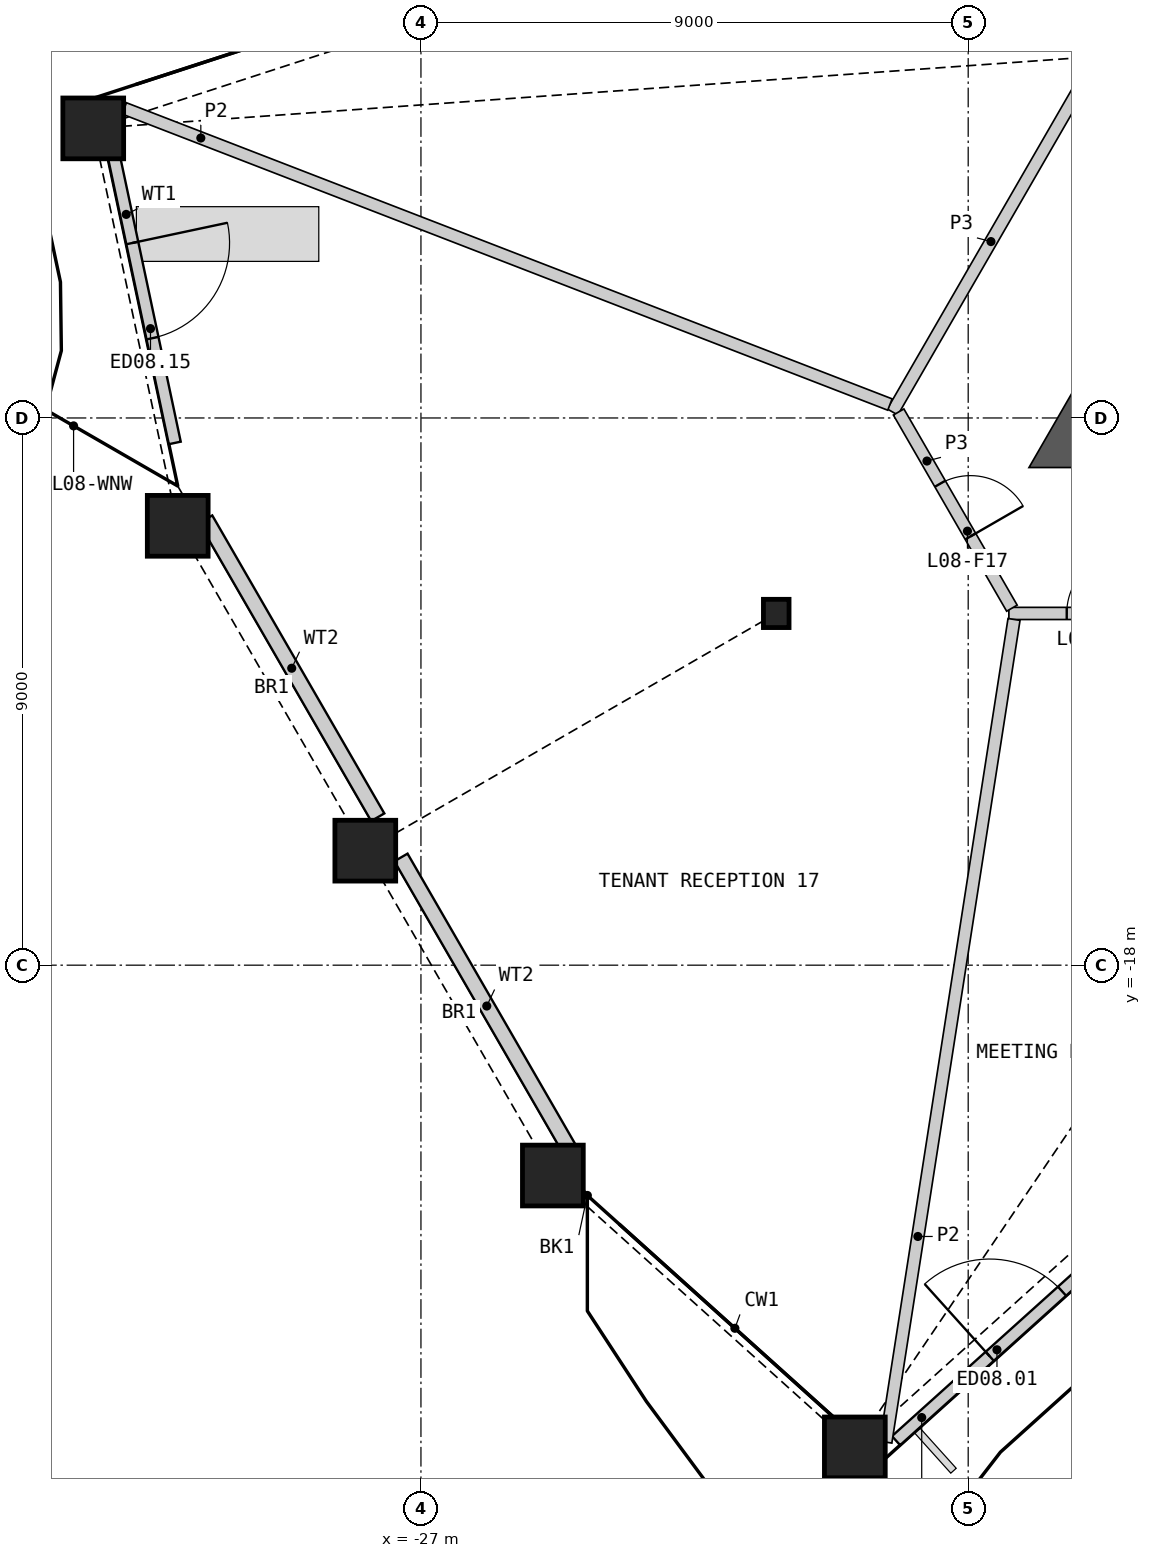
"""IFC4 building model, lengths in metres.
Left out: names, types, materials, properties, quantities, classifications, styles, units other than length and angle.
Written with IfcOpenShell. Run it as: python <this file> out.ifc"""

import sys

from ifc_helpers import new_model, si_unit, direction, frame, frame_2d, origin, origin_2d, place, context, subcontext, project, spatial, polyline, rectangle, hollow_rectangle, i_section, outline, extrude, element, fill, save


model = new_model("IFC4")
c1 = context("Model", 3, precision=1e-05, world=origin(), true_north=direction((0.0, 1.0)))
c2 = subcontext(c1, "Body", "Model", "MODEL_VIEW")
j1 = project(units=[si_unit("LENGTHUNIT", "METRE"), si_unit("PLANEANGLEUNIT", "RADIAN")], contexts=[c1])
p1 = place(None, origin())
s1 = spatial("IfcSite", under=j1, at=p1, CompositionType="ELEMENT")
p2 = place(p1, origin())
s2 = spatial("IfcBuilding", under=s1, at=p2, CompositionType="ELEMENT")
p3 = place(p2, frame((0.0, 0.0, 42.6)))
s3 = spatial("IfcBuildingStorey", under=s2, at=p3, CompositionType="ELEMENT", Elevation=42.6)
for number, where, z_axis, x_axis in (
    (1, (-24.83, -21.46, 0.0), (0.0, 0.0, 1.0), (1.0, 0.0, 0.0)),
    (2, (-19.864, -25.931, 0.0), (0.0, 0.0, 1.0), (1.0, 0.0, 0.0)),
    (3, (-32.389, -4.237, 0.0), (0.0, 0.0, 1.0), (1.0, 0.0, 0.0)),
    (4, (-31.0, -10.774, 0.0), (0.0, 0.0, 1.0), (1.0, 0.0, 0.0)),
    (5, (-27.915, -16.117, 0.0), (0.0, 0.0, 1.0), (1.0, 0.0, 0.0)),
):
    element("IfcColumn", number, at=place(p3, frame(where, z_axis=z_axis, x_axis=x_axis)), inside=s3, PredefinedType="COLUMN", context=c2, shape_type="SweptSolid", body=[
        extrude(hollow_rectangle(XDim=1.0, YDim=1.0, WallThickness=0.07, at=origin_2d()), origin(), (0.0, 0.0, 1.0), 4.2),
    ])
p4 = place(p3, frame((-21.157, -12.215, 0.0), z_axis=(0.0, 0.0, 1.0), x_axis=(1.0, 0.0, 0.0)))
e6 = element("IfcColumn", 6, at=p4, inside=s3, PredefinedType="COLUMN", context=c2, shape_type="SweptSolid", body=[
    extrude(i_section(OverallWidth=0.421, OverallDepth=0.465, WebThickness=0.045, FlangeThickness=0.072, at=origin_2d()), origin(), (0.0, 0.0, 1.0), 4.2),
])
p5 = place(p3, frame((-19.187, -25.82, 0.0), z_axis=(0.0, 0.0, 1.0), x_axis=(0.743142396166, 0.669133304373, 0.0)))
e7 = element("IfcWall", 7, at=p5, inside=s3, PredefinedType="SOLIDWALL", context=c2, shape_type="SweptSolid", body=[
    extrude(rectangle(XDim=5.68, YDim=0.2, at=frame_2d((2.84, 0.0))), origin(), (0.0, 0.0, 1.0), 3.189),
])
p6 = place(p5, frame((2.073, 0.0, 0.0)))
e8 = element("IfcOpeningElement", 8, at=p6, cuts=e7, PredefinedType="OPENING", context=c2, shape_type="SweptSolid", body=[
    extrude(rectangle(XDim=1.6, YDim=2.4, at=frame_2d((0.8, 1.2))), frame((0.0, 0.11, 0.0), z_axis=(0.0, -1.0, 0.0), x_axis=(1.0, 0.0, 0.0)), (0.0, 0.0, 1.0), 0.22),
])
p7 = place(p3, frame((-32.114, -4.399, 0.0), z_axis=(0.0, 0.0, 1.0), x_axis=(0.207931126702, -0.978143469307, 0.0)))
e9 = element("IfcWall", 9, at=p7, inside=s3, PredefinedType="SOLIDWALL", context=c2, shape_type="SweptSolid", body=[
    extrude(rectangle(XDim=5.124, YDim=0.2, at=frame_2d((2.562, 0.0))), origin(), (0.0, 0.0, 1.0), 3.189),
])
p8 = place(p7, frame((1.762, 0.0, 0.0)))
e10 = element("IfcOpeningElement", 10, at=p8, cuts=e9, PredefinedType="OPENING", context=c2, shape_type="SweptSolid", body=[
    extrude(rectangle(XDim=1.6, YDim=2.4, at=frame_2d((0.8, 1.2))), frame((0.0, 0.11, 0.0), z_axis=(0.0, -1.0, 0.0), x_axis=(1.0, 0.0, 0.0)), (0.0, 0.0, 1.0), 0.22),
])
p9 = place(p3, frame((-30.54, -10.665, 0.0), z_axis=(0.0, 0.0, 1.0), x_axis=(0.499985074313, -0.866034020963, 0.0)))
e11 = element("IfcWall", 11, at=p9, inside=s3, PredefinedType="SOLIDWALL", context=c2, shape_type="SweptSolid", body=[
    extrude(rectangle(XDim=5.66, YDim=0.25, at=frame_2d((2.83, 0.0))), origin(), (0.0, 0.0, 1.0), 3.189),
])
p10 = place(p3, frame((-27.329, -16.228, 0.0), z_axis=(0.0, 0.0, 1.0), x_axis=(0.49999579099, -0.866027833844, 0.0)))
e12 = element("IfcWall", 12, at=p10, inside=s3, PredefinedType="SOLIDWALL", context=c2, shape_type="SweptSolid", body=[
    extrude(rectangle(XDim=5.644, YDim=0.25, at=frame_2d((2.822, 0.0))), origin(), (0.0, 0.0, 1.0), 3.189),
])
p11 = place(p3, origin())
e13 = element("IfcWall", 13, at=p11, inside=s3, PredefinedType="SHEAR", context=c2, shape_type="SweptSolid", body=[
    extrude(outline(polyline([(-16.221, -8.465), (-15.441, -8.915), (-15.441, -9.815), (-17.0, -9.815), (-16.221, -8.465)])), origin(), (0.0, 0.0, 1.0), 3.8),
])
p12 = place(p3, frame((-17.331, -12.215, 0.0), z_axis=(0.0, 0.0, 1.0), x_axis=(1.0, 0.0, 0.0)))
e14 = element("IfcWall", 14, at=p12, inside=s3, PredefinedType="PARTITIONING", context=c2, shape_type="SweptSolid", body=[
    extrude(rectangle(XDim=6.51, YDim=0.2, at=frame_2d((3.255, 0.0))), origin(), (0.0, 0.0, 1.0), 3.8),
])
p13 = place(p12, frame((0.951, 0.0, 0.0)))
e15 = element("IfcOpeningElement", 15, at=p13, cuts=e14, PredefinedType="OPENING", context=c2, shape_type="SweptSolid", body=[
    extrude(rectangle(XDim=1.0, YDim=2.1, at=frame_2d((0.5, 1.05))), frame((0.0, 0.11, 0.0), z_axis=(0.0, -1.0, 0.0), x_axis=(1.0, 0.0, 0.0)), (0.0, 0.0, 1.0), 0.22),
])
p14 = place(p3, frame((-19.244, -8.902, 0.0), z_axis=(0.0, 0.0, 1.0), x_axis=(0.499984737558, 0.86603421538, 0.0)))
e16 = element("IfcWall", 16, at=p14, inside=s3, PredefinedType="PARTITIONING", context=c2, shape_type="SweptSolid", body=[
    extrude(rectangle(XDim=6.473, YDim=0.2, at=frame_2d((3.236, 0.0))), origin(), (0.0, 0.0, 1.0), 3.8),
])
p15 = place(p3, frame((-19.144, -8.902, 0.0), z_axis=(0.0, 0.0, 1.0), x_axis=(0.499958791762, -0.866049194065, 0.0)))
e17 = element("IfcWall", 17, at=p15, inside=s3, PredefinedType="PARTITIONING", context=c2, shape_type="SweptSolid", body=[
    extrude(rectangle(XDim=3.726, YDim=0.2, at=frame_2d((1.863, 0.0))), origin(), (0.0, 0.0, 1.0), 3.8),
])
p16 = place(p15, frame((1.363, 0.0, 0.0)))
e18 = element("IfcOpeningElement", 18, at=p16, cuts=e17, PredefinedType="OPENING", context=c2, shape_type="SweptSolid", body=[
    extrude(rectangle(XDim=1.0, YDim=2.1, at=frame_2d((0.5, 1.05))), frame((0.0, 0.11, 0.0), z_axis=(0.0, -1.0, 0.0), x_axis=(1.0, 0.0, 0.0)), (0.0, 0.0, 1.0), 0.22),
])
p17 = place(p3, frame((-19.354, -25.845, 0.0), z_axis=(0.0, 0.0, 1.0), x_axis=(0.153927101979, 0.98808220674, 0.0)))
e19 = element("IfcWall", 19, at=p17, inside=s3, PredefinedType="PARTITIONING", context=c2, shape_type="SweptSolid", body=[
    extrude(rectangle(XDim=13.694, YDim=0.2, at=frame_2d((6.847, 0.0))), origin(), (0.0, 0.0, 1.0), 2.885),
])
p18 = place(p3, frame((-31.879, -3.908, 0.0), z_axis=(0.0, 0.0, 1.0), x_axis=(0.932669586354, -0.360731815467, 0.0)))
e20 = element("IfcWall", 20, at=p18, inside=s3, PredefinedType="PARTITIONING", context=c2, shape_type="SweptSolid", body=[
    extrude(rectangle(XDim=13.501, YDim=0.2, at=frame_2d((6.75, 0.0))), origin(), (0.0, 0.0, 1.0), 2.885),
])
p19 = place(p6, origin())
e21 = element("IfcDoor", 21, at=p19, inside=s3, OperationType="DOUBLE_DOOR_SINGLE_SWING", PredefinedType="DOOR", context=c2, shape_type="SweptSolid", body=[
    extrude(rectangle(XDim=1.6, YDim=2.4, at=frame_2d((0.8, 1.2))), frame((0.0, 0.025, 0.0), z_axis=(0.0, -1.0, 0.0), x_axis=(1.0, 0.0, 0.0)), (0.0, 0.0, 1.0), 0.05),
])
fill(e8, e21)
p20 = place(p8, origin())
e22 = element("IfcDoor", 22, at=p20, inside=s3, OperationType="DOUBLE_DOOR_SINGLE_SWING", PredefinedType="DOOR", context=c2, shape_type="SweptSolid", body=[
    extrude(rectangle(XDim=1.6, YDim=2.4, at=frame_2d((0.8, 1.2))), frame((0.0, 0.025, 0.0), z_axis=(0.0, -1.0, 0.0), x_axis=(1.0, 0.0, 0.0)), (0.0, 0.0, 1.0), 0.05),
])
fill(e10, e22)
p21 = place(p13, origin())
e23 = element("IfcDoor", 23, at=p21, inside=s3, OperationType="SINGLE_SWING_RIGHT", PredefinedType="DOOR", context=c2, shape_type="SweptSolid", body=[
    extrude(rectangle(XDim=1.0, YDim=2.1, at=frame_2d((0.5, 1.05))), frame((0.0, 0.025, 0.0), z_axis=(0.0, -1.0, 0.0), x_axis=(1.0, 0.0, 0.0)), (0.0, 0.0, 1.0), 0.05),
])
fill(e15, e23)
p22 = place(p16, origin())
e24 = element("IfcDoor", 24, at=p22, inside=s3, OperationType="SINGLE_SWING_RIGHT", PredefinedType="DOOR", context=c2, shape_type="SweptSolid", body=[
    extrude(rectangle(XDim=1.0, YDim=2.1, at=frame_2d((0.5, 1.05))), frame((0.0, 0.025, 0.0), z_axis=(0.0, -1.0, 0.0), x_axis=(1.0, 0.0, 0.0)), (0.0, 0.0, 1.0), 0.05),
])
fill(e18, e24)
save(model, sys.argv[1])
